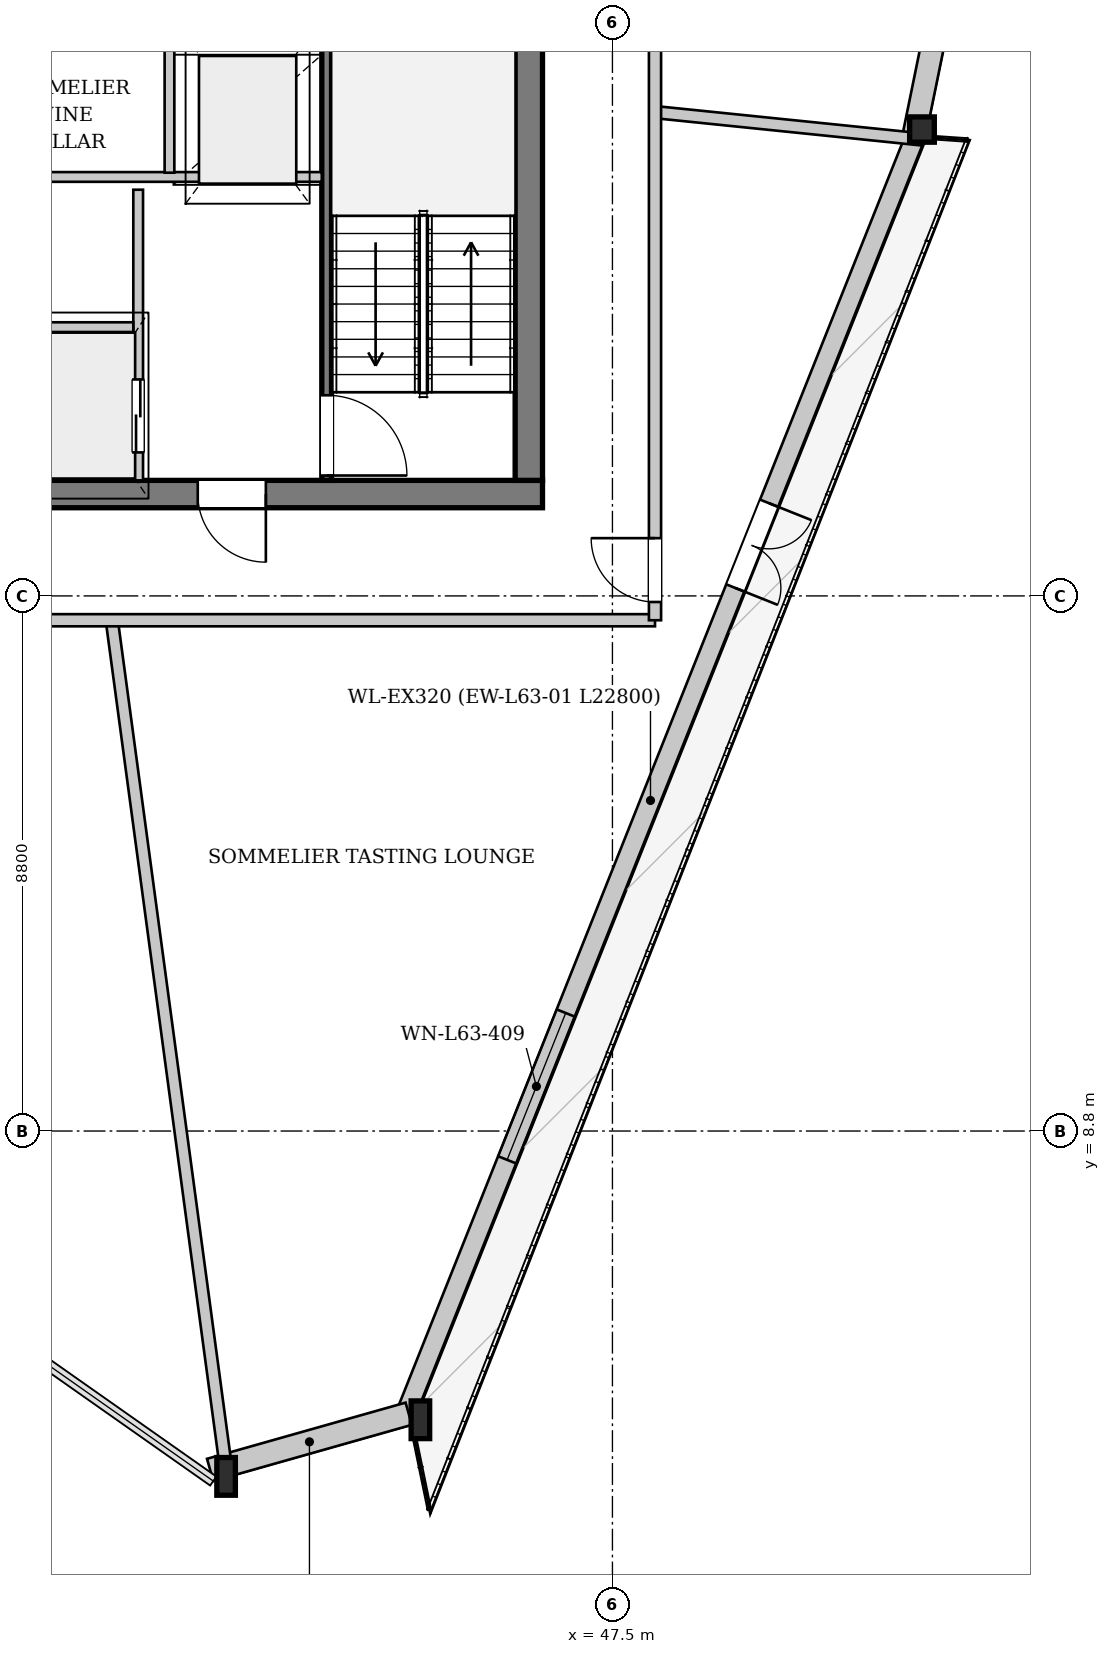
"""IFC4 building model, lengths in metres.
Left out: names, types, materials, properties, quantities, classifications, styles, units other than length and angle.
Written with IfcOpenShell. Run it as: python <this file> out.ifc"""

import sys

from ifc_helpers import new_model, si_unit, direction, frame, frame_2d, origin, origin_2d, place, context, subcontext, project, spatial, rectangle, i_section, extrude, source, transform, mapped, element, fill, save


model = new_model("IFC4")
c1 = context("Model", 3, precision=1e-05, world=origin(), true_north=direction((0.0, 1.0)))
c2 = subcontext(c1, "Body", "Model", "MODEL_VIEW")
j1 = project(units=[si_unit("LENGTHUNIT", "METRE"), si_unit("PLANEANGLEUNIT", "RADIAN")], contexts=[c1])
p1 = place(None, origin())
s1 = spatial("IfcSite", under=j1, at=p1, CompositionType="ELEMENT")
p2 = place(p1, origin())
s2 = spatial("IfcBuilding", under=s1, at=p2, CompositionType="ELEMENT")
p3 = place(p2, frame((0.0, 0.0, 238.1)))
s3 = spatial("IfcBuildingStorey", under=s2, at=p3, CompositionType="ELEMENT", Elevation=238.1)
m1 = source(origin(), c2, "Body", "SweptSolid", [
    extrude(i_section(OverallWidth=0.305, OverallDepth=0.62, WebThickness=0.021, FlangeThickness=0.04, at=origin_2d()), origin(), (0.0, 0.0, 1.0), 3.464),
])
p4 = place(p3, frame((40.936, 3.044, 0.0), z_axis=(0.121578996156, 0.044332283236, 0.991591244595), x_axis=(-0.342573792128, 0.939490924356, 0.0)))
e1 = element("IfcColumn", 1, at=p4, inside=s3, PredefinedType="COLUMN", context=c2, shape_type="MappedRepresentation", body=[
    mapped(m1, transform((0.0, 0.0, 0.0), x_axis=(1.0, 0.0, 0.0), y_axis=(0.0, 1.0, 0.0), z_axis=(0.0, 0.0, 1.0), scale=1.0)),
])
m2 = source(origin(), c2, "Body", "SweptSolid", [
    extrude(i_section(OverallWidth=0.305, OverallDepth=0.62, WebThickness=0.021, FlangeThickness=0.04, at=origin_2d()), origin(), (0.0, 0.0, 1.0), 3.45),
])
p5 = place(p3, frame((44.201, 3.968, 0.0), z_axis=(0.081302520887, 0.048399411912, 0.995513634776), x_axis=(-0.511523301664, 0.859269405865, 0.0)))
e2 = element("IfcColumn", 2, at=p5, inside=s3, PredefinedType="COLUMN", context=c2, shape_type="MappedRepresentation", body=[
    mapped(m2, transform((0.0, 0.0, 0.0), x_axis=(1.0, 0.0, 0.0), y_axis=(0.0, 1.0, 0.0), z_axis=(0.0, 0.0, 1.0), scale=1.0)),
])
m3 = source(origin(), c2, "Body", "SweptSolid", [
    extrude(i_section(OverallWidth=0.406, OverallDepth=0.416, WebThickness=0.027, FlangeThickness=0.042, at=origin_2d()), origin(), (0.0, 0.0, 1.0), 3.446),
])
p6 = place(p3, frame((52.65, 25.145, 0.0), z_axis=(-0.034574881015, 0.072196319169, 0.996790985664), x_axis=(-0.90190942195, -0.431925218755, 0.0)))
e3 = element("IfcColumn", 3, at=p6, inside=s3, PredefinedType="COLUMN", context=c2, shape_type="MappedRepresentation", body=[
    mapped(m3, transform((0.0, 0.0, 0.0), x_axis=(1.0, 0.0, 0.0), y_axis=(0.0, 1.0, 0.0), z_axis=(0.0, 0.0, 1.0), scale=1.0)),
])
p7 = place(p3, frame((52.502, 25.204, 0.0), z_axis=(0.0, 0.0, 1.0), x_axis=(-0.37055605209, -0.928810105597, 0.0)))
e4 = element("IfcWall", 4, at=p7, inside=s3, PredefinedType="SOLIDWALL", context=c2, shape_type="SweptSolid", body=[
    extrude(rectangle(XDim=22.8, YDim=0.32, at=frame_2d((11.4, 0.0))), origin(), (0.0, 0.0, 1.0), 2.872),
])
p8 = place(p7, frame((6.546, 0.0, 0.0)))
e5 = element("IfcOpeningElement", 5, at=p8, cuts=e4, PredefinedType="OPENING", context=c2, shape_type="SweptSolid", body=[
    extrude(rectangle(XDim=1.5, YDim=2.3, at=frame_2d((0.75, 1.15))), frame((0.0, 0.17, 0.0), z_axis=(0.0, -1.0, 0.0), x_axis=(1.0, 0.0, 0.0)), (0.0, 0.0, 1.0), 0.34),
])
p9 = place(p7, frame((15.572, 0.0, 0.402)))
e6 = element("IfcOpeningElement", 6, at=p9, cuts=e4, PredefinedType="OPENING", context=c2, shape_type="SweptSolid", body=[
    extrude(rectangle(XDim=2.6, YDim=2.35, at=frame_2d((1.3, 1.175))), frame((0.0, 0.17, 0.0), z_axis=(0.0, -1.0, 0.0), x_axis=(1.0, 0.0, 0.0)), (0.0, 0.0, 1.0), 0.34),
])
p10 = place(p3, frame((44.15, 4.151, 0.0), z_axis=(0.0, 0.0, 1.0), x_axis=(-0.962229156425, -0.272240795117, 0.0)))
e7 = element("IfcWall", 7, at=p10, inside=s3, PredefinedType="SOLIDWALL", context=c2, shape_type="SweptSolid", body=[
    extrude(rectangle(XDim=3.394, YDim=0.38, at=frame_2d((1.697, 0.0))), origin(), (0.0, 0.0, 1.0), 2.872),
])
p11 = place(p3, frame((57.03, 47.521, 0.0), z_axis=(0.0, 0.0, 1.0), x_axis=(-0.200236926918, -0.979747504768, 0.0)))
e8 = element("IfcWall", 8, at=p11, inside=s3, PredefinedType="SOLIDWALL", context=c2, shape_type="SweptSolid", body=[
    extrude(rectangle(XDim=22.8, YDim=0.38, at=frame_2d((11.4, 0.0))), origin(), (0.0, 0.0, 1.0), 2.872),
])
p12 = place(p11, frame((5.284, 0.0, 0.502)))
e9 = element("IfcOpeningElement", 9, at=p12, cuts=e8, PredefinedType="OPENING", context=c2, shape_type="SweptSolid", body=[
    extrude(rectangle(XDim=2.2, YDim=2.25, at=frame_2d((1.1, 1.125))), frame((0.0, 0.2, 0.0), z_axis=(0.0, -1.0, 0.0), x_axis=(1.0, 0.0, 0.0)), (0.0, 0.0, 1.0), 0.4),
])
p13 = place(p11, frame((15.316, 0.0, 0.502)))
e10 = element("IfcOpeningElement", 10, at=p13, cuts=e8, PredefinedType="OPENING", context=c2, shape_type="SweptSolid", body=[
    extrude(rectangle(XDim=2.2, YDim=2.25, at=frame_2d((1.1, 1.125))), frame((0.0, 0.2, 0.0), z_axis=(0.0, -1.0, 0.0), x_axis=(1.0, 0.0, 0.0)), (0.0, 0.0, 1.0), 0.4),
])
p14 = place(p3, frame((46.35, 19.275, 0.0), z_axis=(0.0, 0.0, 1.0), x_axis=(-1.0, 0.0, 0.0)))
e11 = element("IfcWall", 11, at=p14, inside=s3, PredefinedType="SHEAR", context=c2, shape_type="SweptSolid", body=[
    extrude(rectangle(XDim=16.7, YDim=0.45, at=frame_2d((8.35, 0.0))), origin(), (0.0, 0.0, 1.0), 3.38),
])
p15 = place(p14, frame((4.55, 0.0, 0.0)))
e12 = element("IfcOpeningElement", 12, at=p15, cuts=e11, PredefinedType="OPENING", context=c2, shape_type="SweptSolid", body=[
    extrude(rectangle(XDim=1.12, YDim=2.25, at=frame_2d((0.56, 1.125))), frame((0.0, 0.235, 0.0), z_axis=(0.0, -1.0, 0.0), x_axis=(1.0, 0.0, 0.0)), (0.0, 0.0, 1.0), 0.47),
])
p16 = place(p14, frame((11.05, 0.0, 0.0)))
e13 = element("IfcOpeningElement", 13, at=p16, cuts=e11, PredefinedType="OPENING", context=c2, shape_type="SweptSolid", body=[
    extrude(rectangle(XDim=1.12, YDim=2.25, at=frame_2d((0.56, 1.125))), frame((0.0, 0.235, 0.0), z_axis=(0.0, -1.0, 0.0), x_axis=(1.0, 0.0, 0.0)), (0.0, 0.0, 1.0), 0.47),
])
p17 = place(p3, frame((46.125, 33.7, 0.0), z_axis=(0.0, 0.0, 1.0), x_axis=(0.0, -1.0, 0.0)))
e14 = element("IfcWall", 14, at=p17, inside=s3, PredefinedType="SHEAR", context=c2, shape_type="SweptSolid", body=[
    extrude(rectangle(XDim=14.2, YDim=0.45, at=frame_2d((7.1, 0.0))), origin(), (0.0, 0.0, 1.0), 3.38),
])
p18 = place(p17, frame((5.18, 0.0, 0.0)))
e15 = element("IfcOpeningElement", 15, at=p18, cuts=e14, PredefinedType="OPENING", context=c2, shape_type="SweptSolid", body=[
    extrude(rectangle(XDim=1.6, YDim=2.2, at=frame_2d((0.8, 1.1))), frame((0.0, 0.235, 0.0), z_axis=(0.0, -1.0, 0.0), x_axis=(1.0, 0.0, 0.0)), (0.0, 0.0, 1.0), 0.47),
])
p19 = place(p17, frame((2.05, 0.0, 0.0)))
e16 = element("IfcOpeningElement", 16, at=p19, cuts=e14, PredefinedType="OPENING", context=c2, shape_type="SweptSolid", body=[
    extrude(rectangle(XDim=0.95, YDim=2.1, at=frame_2d((0.475, 1.05))), frame((0.0, 0.235, 0.0), z_axis=(0.0, -1.0, 0.0), x_axis=(1.0, 0.0, 0.0)), (0.0, 0.0, 1.0), 0.47),
])
p20 = place(p3, frame((42.8, 26.96, 0.0), z_axis=(0.0, 0.0, 1.0), x_axis=(0.0, -1.0, 0.0)))
e17 = element("IfcWall", 17, at=p20, inside=s3, PredefinedType="PARTITIONING", context=c2, shape_type="SweptSolid", body=[
    extrude(rectangle(XDim=7.46, YDim=0.16, at=frame_2d((3.73, 0.0))), origin(), (0.0, 0.0, 1.0), 3.38),
])
p21 = place(p20, frame((6.06, 0.0, 0.0)))
e18 = element("IfcOpeningElement", 18, at=p21, cuts=e17, PredefinedType="OPENING", context=c2, shape_type="SweptSolid", body=[
    extrude(rectangle(XDim=1.32, YDim=2.2, at=frame_2d((0.66, 1.1))), frame((0.0, 0.09, 0.0), z_axis=(0.0, -1.0, 0.0), x_axis=(1.0, 0.0, 0.0)), (0.0, 0.0, 1.0), 0.18),
])
p22 = place(p3, frame((39.7, 24.28, 0.0), z_axis=(0.0, 0.0, 1.0), x_axis=(0.0, -1.0, 0.0)))
e19 = element("IfcWall", 19, at=p22, inside=s3, PredefinedType="PARTITIONING", context=c2, shape_type="SweptSolid", body=[
    extrude(rectangle(XDim=4.78, YDim=0.16, at=frame_2d((2.39, 0.0))), origin(), (0.0, 0.0, 1.0), 3.38),
])
p23 = place(p22, frame((3.12, 0.0, 0.0)))
e20 = element("IfcOpeningElement", 20, at=p23, cuts=e19, PredefinedType="OPENING", context=c2, shape_type="SweptSolid", body=[
    extrude(rectangle(XDim=1.2, YDim=2.2, at=frame_2d((0.6, 1.1))), frame((0.0, 0.09, 0.0), z_axis=(0.0, -1.0, 0.0), x_axis=(1.0, 0.0, 0.0)), (0.0, 0.0, 1.0), 0.18),
])
p24 = place(p3, frame((36.38, 22.02, 0.0), z_axis=(0.0, 0.0, 1.0), x_axis=(1.0, 0.0, 0.0)))
e21 = element("IfcWall", 21, at=p24, inside=s3, PredefinedType="PARTITIONING", context=c2, shape_type="SweptSolid", body=[
    extrude(rectangle(XDim=3.24, YDim=0.16, at=frame_2d((1.62, 0.0))), origin(), (0.0, 0.0, 1.0), 3.38),
])
p25 = place(p3, frame((33.28, 24.49, 0.0), z_axis=(0.0, 0.0, 1.0), x_axis=(1.0, 0.0, 0.0)))
e22 = element("IfcWall", 22, at=p25, inside=s3, PredefinedType="PARTITIONING", context=c2, shape_type="SweptSolid", body=[
    extrude(rectangle(XDim=9.44, YDim=0.16, at=frame_2d((4.72, 0.0))), origin(), (0.0, 0.0, 1.0), 3.38),
])
p26 = place(p3, frame((40.215, 24.56, 0.0), z_axis=(0.0, 0.0, 1.0), x_axis=(0.0, 1.0, 0.0)))
e23 = element("IfcWall", 23, at=p26, inside=s3, PredefinedType="PARTITIONING", context=c2, shape_type="SweptSolid", body=[
    extrude(rectangle(XDim=2.31, YDim=0.16, at=frame_2d((1.155, 0.0))), origin(), (0.0, 0.0, 1.0), 3.38),
])
p27 = place(p3, frame((39.266, 17.2, 0.0), z_axis=(0.0, 0.0, 1.0), x_axis=(0.133457513992, -0.99105453531, 0.0)))
e24 = element("IfcWall", 24, at=p27, inside=s3, PredefinedType="PARTITIONING", context=c2, shape_type="SweptSolid", body=[
    extrude(rectangle(XDim=14.188, YDim=0.2, at=frame_2d((7.094, 0.0))), origin(), (0.0, 0.0, 1.0), 3.38),
])
p28 = place(p3, frame((48.2, 25.556, 0.0), z_axis=(0.0, 0.0, 1.0), x_axis=(0.994801232094, -0.101835694252, 0.0)))
e25 = element("IfcWall", 25, at=p28, inside=s3, PredefinedType="PARTITIONING", context=c2, shape_type="SweptSolid", body=[
    extrude(rectangle(XDim=4.426, YDim=0.2, at=frame_2d((2.213, 0.0))), origin(), (0.0, 0.0, 1.0), 2.915),
])
p29 = place(p3, frame((27.8, 17.2, 0.0), z_axis=(0.0, 0.0, 1.0), x_axis=(1.0, 0.0, 0.0)))
e26 = element("IfcWall", 26, at=p29, inside=s3, PredefinedType="PARTITIONING", context=c2, shape_type="SweptSolid", body=[
    extrude(rectangle(XDim=20.4, YDim=0.2, at=frame_2d((10.2, 0.0))), origin(), (0.0, 0.0, 1.0), 3.38),
])
p30 = place(p29, frame((4.024, 0.0, 0.0)))
e27 = element("IfcOpeningElement", 27, at=p30, cuts=e26, PredefinedType="OPENING", context=c2, shape_type="SweptSolid", body=[
    extrude(rectangle(XDim=1.05, YDim=2.2, at=frame_2d((0.525, 1.1))), frame((0.0, 0.11, 0.0), z_axis=(0.0, -1.0, 0.0), x_axis=(1.0, 0.0, 0.0)), (0.0, 0.0, 1.0), 0.22),
])
p31 = place(p3, frame((48.2, 17.2, 0.0), z_axis=(0.0, 0.0, 1.0), x_axis=(0.0, 1.0, 0.0)))
e28 = element("IfcWall", 28, at=p31, inside=s3, PredefinedType="PARTITIONING", context=c2, shape_type="SweptSolid", body=[
    extrude(rectangle(XDim=18.8, YDim=0.2, at=frame_2d((9.4, 0.0))), origin(), (0.0, 0.0, 1.0), 3.125),
])
p32 = place(p31, frame((0.3, 0.0, 0.0)))
e29 = element("IfcOpeningElement", 29, at=p32, cuts=e28, PredefinedType="OPENING", context=c2, shape_type="SweptSolid", body=[
    extrude(rectangle(XDim=1.05, YDim=2.2, at=frame_2d((0.525, 1.1))), frame((0.0, 0.11, 0.0), z_axis=(0.0, -1.0, 0.0), x_axis=(1.0, 0.0, 0.0)), (0.0, 0.0, 1.0), 0.22),
])
m4 = source(origin(), c2, "Body", "SweptSolid", [
    extrude(rectangle(XDim=1.5, YDim=2.3, at=frame_2d((0.75, 1.15))), frame((0.0, 0.025, 0.0), z_axis=(0.0, -1.0, 0.0), x_axis=(1.0, 0.0, 0.0)), (0.0, 0.0, 1.0), 0.05),
])
p33 = place(p8, origin())
e30 = element("IfcDoor", 30, at=p33, inside=s3, OperationType="DOUBLE_DOOR_SINGLE_SWING", PredefinedType="DOOR", context=c2, shape_type="MappedRepresentation", body=[
    mapped(m4, transform((0.0, 0.0, 0.0), x_axis=(1.0, 0.0, 0.0), y_axis=(0.0, 1.0, 0.0), z_axis=(0.0, 0.0, 1.0), scale=1.0)),
])
fill(e5, e30)
m5 = source(origin(), c2, "Body", "SweptSolid", [
    extrude(rectangle(XDim=2.6, YDim=2.35, at=frame_2d((1.3, 1.175))), frame((0.0, 0.03, 0.0), z_axis=(0.0, -1.0, 0.0), x_axis=(1.0, 0.0, 0.0)), (0.0, 0.0, 1.0), 0.06),
])
p34 = place(p9, origin())
e31 = element("IfcWindow", 31, at=p34, inside=s3, PartitioningType="SINGLE_PANEL", PredefinedType="WINDOW", context=c2, shape_type="MappedRepresentation", body=[
    mapped(m5, transform((0.0, 0.0, 0.0), x_axis=(1.0, 0.0, 0.0), y_axis=(0.0, 1.0, 0.0), z_axis=(0.0, 0.0, 1.0), scale=1.0)),
])
fill(e6, e31)
m6 = source(origin(), c2, "Body", "SweptSolid", [
    extrude(rectangle(XDim=1.12, YDim=2.25, at=frame_2d((0.56, 1.125))), frame((0.0, 0.025, 0.0), z_axis=(0.0, -1.0, 0.0), x_axis=(1.0, 0.0, 0.0)), (0.0, 0.0, 1.0), 0.05),
])
p35 = place(p15, origin())
e32 = element("IfcDoor", 32, at=p35, inside=s3, OperationType="SINGLE_SWING_LEFT", PredefinedType="DOOR", context=c2, shape_type="MappedRepresentation", body=[
    mapped(m6, transform((0.0, 0.0, 0.0), x_axis=(1.0, 0.0, 0.0), y_axis=(0.0, 1.0, 0.0), z_axis=(0.0, 0.0, 1.0), scale=1.0)),
])
fill(e12, e32)
m7 = source(origin(), c2, "Body", "SweptSolid", [
    extrude(rectangle(XDim=1.32, YDim=2.2, at=frame_2d((0.66, 1.1))), frame((0.0, 0.025, 0.0), z_axis=(0.0, -1.0, 0.0), x_axis=(1.0, 0.0, 0.0)), (0.0, 0.0, 1.0), 0.05),
])
p36 = place(p21, origin())
e33 = element("IfcDoor", 33, at=p36, inside=s3, OperationType="SINGLE_SWING_RIGHT", PredefinedType="DOOR", context=c2, shape_type="MappedRepresentation", body=[
    mapped(m7, transform((0.0, 0.0, 0.0), x_axis=(1.0, 0.0, 0.0), y_axis=(0.0, 1.0, 0.0), z_axis=(0.0, 0.0, 1.0), scale=1.0)),
])
fill(e18, e33)
m8 = source(origin(), c2, "Body", "SweptSolid", [
    extrude(rectangle(XDim=1.2, YDim=2.2, at=frame_2d((0.6, 1.1))), frame((0.0, 0.025, 0.0), z_axis=(0.0, -1.0, 0.0), x_axis=(1.0, 0.0, 0.0)), (0.0, 0.0, 1.0), 0.05),
])
p37 = place(p23, origin())
e34 = element("IfcDoor", 34, at=p37, inside=s3, OperationType="DOUBLE_DOOR_SLIDING", PredefinedType="DOOR", context=c2, shape_type="MappedRepresentation", body=[
    mapped(m8, transform((0.0, 0.0, 0.0), x_axis=(1.0, 0.0, 0.0), y_axis=(0.0, 1.0, 0.0), z_axis=(0.0, 0.0, 1.0), scale=1.0)),
])
fill(e20, e34)
m9 = source(origin(), c2, "Body", "SweptSolid", [
    extrude(rectangle(XDim=1.05, YDim=2.2, at=frame_2d((0.525, 1.1))), frame((0.0, 0.025, 0.0), z_axis=(0.0, -1.0, 0.0), x_axis=(1.0, 0.0, 0.0)), (0.0, 0.0, 1.0), 0.05),
])
p38 = place(p32, origin())
e35 = element("IfcDoor", 35, at=p38, inside=s3, OperationType="SINGLE_SWING_RIGHT", PredefinedType="DOOR", context=c2, shape_type="MappedRepresentation", body=[
    mapped(m9, transform((0.0, 0.0, 0.0), x_axis=(1.0, 0.0, 0.0), y_axis=(0.0, 1.0, 0.0), z_axis=(0.0, 0.0, 1.0), scale=1.0)),
])
fill(e29, e35)
save(model, sys.argv[1])
